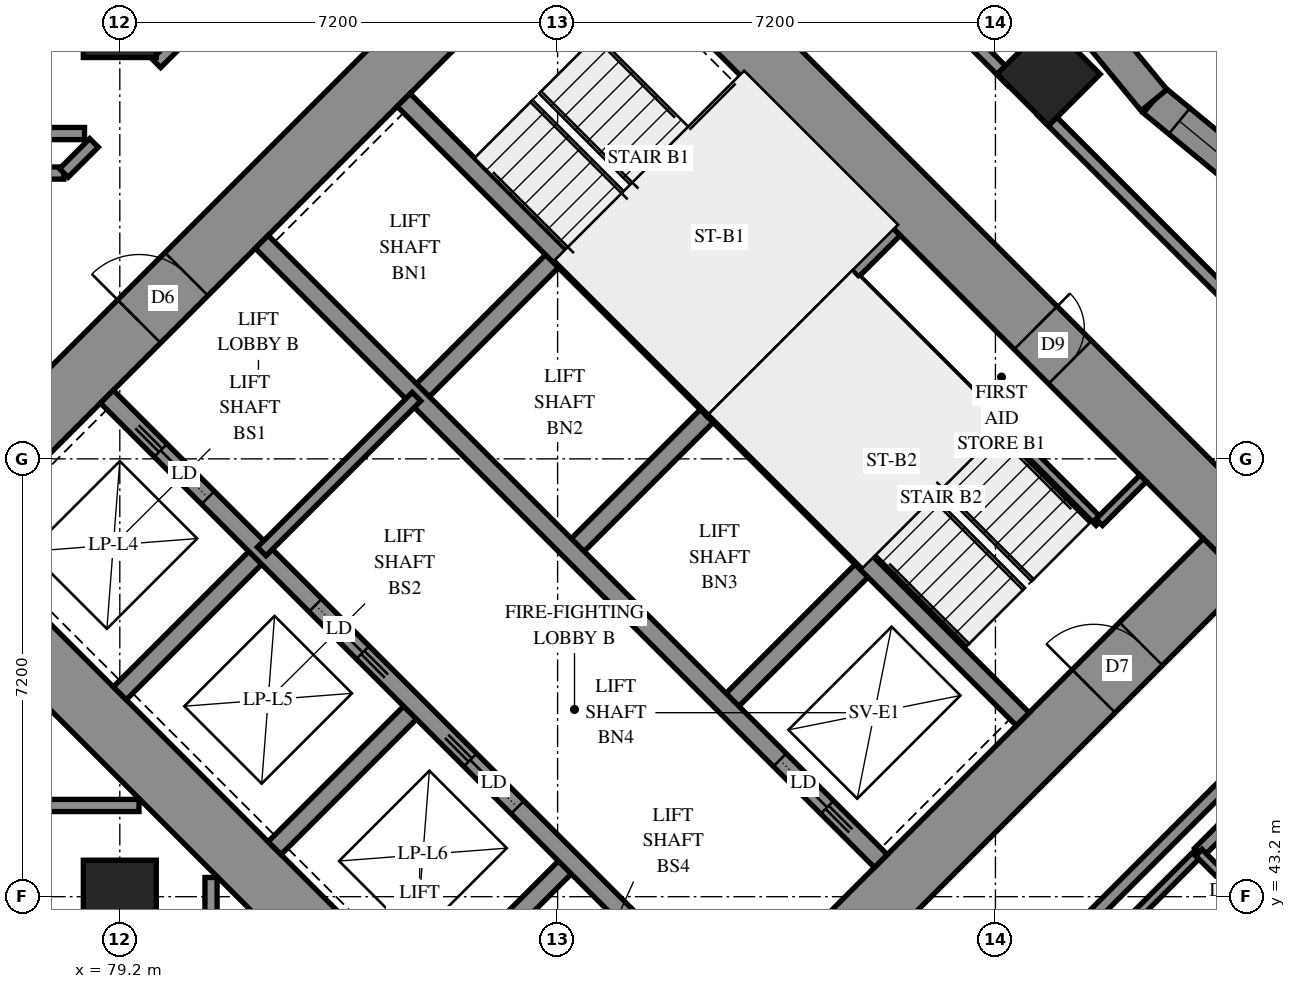
"""IFC4 building model, lengths in metres.
Left out: names, types, materials, properties, quantities, classifications, styles, units other than length and angle.
Written with IfcOpenShell. Run it as: python <this file> out.ifc"""

import sys

from ifc_helpers import new_model, si_unit, direction, frame, frame_2d, origin, origin_2d, place, context, subcontext, project, spatial, polyline, rectangle, outline, extrude, element, fill, save


model = new_model("IFC4")
c1 = context("Model", 3, precision=1e-05, world=origin(), true_north=direction((0.0, 1.0)))
c2 = subcontext(c1, "Body", "Model", "MODEL_VIEW")
j1 = project(units=[si_unit("LENGTHUNIT", "METRE"), si_unit("PLANEANGLEUNIT", "RADIAN")], contexts=[c1])
p1 = place(None, origin())
s1 = spatial("IfcSite", under=j1, at=p1, CompositionType="ELEMENT")
p2 = place(p1, origin())
s2 = spatial("IfcBuilding", under=s1, at=p2, CompositionType="ELEMENT")
p3 = place(p2, frame((0.0, 0.0, 30.4)))
s3 = spatial("IfcBuildingStorey", under=s2, at=p3, CompositionType="ELEMENT", Elevation=30.4)
for number, where, z_axis, x_axis in (
    (1, (79.2, 43.2, 0.0), (0.0, 0.0, 1.0), (1.0, 0.0, 0.0)),
    (2, (79.2, 57.6, 0.0), (0.0, 0.0, 1.0), (1.0, 0.0, 0.0)),
    (3, (94.474, 56.727, 0.0), (0.0, 0.0, 1.0), (0.707, -0.707, 0.0)),
):
    element("IfcColumn", number, at=place(p3, frame(where, z_axis=z_axis, x_axis=x_axis)), inside=s3, PredefinedType="COLUMN", context=c2, shape_type="SweptSolid", body=[
        extrude(rectangle(XDim=1.2, YDim=1.2, at=origin_2d()), origin(), (0.0, 0.0, 1.0), 3.1),
    ])
p4 = place(p3, frame((75.594, 49.443, -0.3), z_axis=(0.0, 0.0, 1.0), x_axis=(0.7071037324, -0.70710983, 0.0)))
e4 = element("IfcWall", 4, at=p4, inside=s3, PredefinedType="SHEAR", context=c2, shape_type="SweptSolid", body=[
    extrude(rectangle(XDim=16.4, YDim=1.0, at=frame_2d((8.2, 0.0))), origin(), (0.0, 0.0, 1.0), 2.7),
])
p5 = place(p3, frame((86.483, 60.333, -0.3), z_axis=(0.0, 0.0, 1.0), x_axis=(0.70710983, -0.7071037324, 0.0)))
e5 = element("IfcWall", 5, at=p5, inside=s3, PredefinedType="SHEAR", context=c2, shape_type="SweptSolid", body=[
    extrude(rectangle(XDim=16.4, YDim=1.0, at=frame_2d((8.2, 0.0))), origin(), (0.0, 0.0, 1.0), 2.7),
])
p6 = place(p5, frame((11.0, 0.0, 0.3)))
e6 = element("IfcOpeningElement", 6, at=p6, cuts=e5, PredefinedType="OPENING", context=c2, shape_type="SweptSolid", body=[
    extrude(rectangle(XDim=0.8, YDim=2.1, at=frame_2d((0.4, 1.05))), frame((0.0, 0.51, 0.0), z_axis=(0.0, -1.0, 0.0), x_axis=(1.0, 0.0, 0.0)), (0.0, 0.0, 1.0), 1.02),
])
p7 = place(p3, frame((76.301, 49.443, -0.3), z_axis=(0.0, 0.0, 1.0), x_axis=(0.7071067812, 0.7071067812, 0.0)))
e7 = element("IfcWall", 7, at=p7, inside=s3, PredefinedType="SHEAR", context=c2, shape_type="SweptSolid", body=[
    extrude(rectangle(XDim=14.4, YDim=1.0, at=frame_2d((7.2, 0.0))), origin(), (0.0, 0.0, 1.0), 2.7),
])
p8 = place(p7, frame((4.55, 0.0, 0.3)))
e8 = element("IfcOpeningElement", 8, at=p8, cuts=e7, PredefinedType="OPENING", context=c2, shape_type="SweptSolid", body=[
    extrude(rectangle(XDim=1.1, YDim=2.1, at=frame_2d((0.55, 1.05))), frame((0.0, 0.51, 0.0), z_axis=(0.0, -1.0, 0.0), x_axis=(1.0, 0.0, 0.0)), (0.0, 0.0, 1.0), 1.02),
])
p9 = place(p7, frame((11.35, 0.0, 0.3)))
e9 = element("IfcOpeningElement", 9, at=p9, cuts=e7, PredefinedType="OPENING", context=c2, shape_type="SweptSolid", body=[
    extrude(rectangle(XDim=1.1, YDim=2.1, at=frame_2d((0.55, 1.05))), frame((0.0, 0.51, 0.0), z_axis=(0.0, -1.0, 0.0), x_axis=(1.0, 0.0, 0.0)), (0.0, 0.0, 1.0), 1.02),
])
p10 = place(p3, frame((87.19, 38.554, -0.3), z_axis=(0.0, 0.0, 1.0), x_axis=(0.707103309, 0.7071102534, 0.0)))
e10 = element("IfcWall", 10, at=p10, inside=s3, PredefinedType="SHEAR", context=c2, shape_type="SweptSolid", body=[
    extrude(rectangle(XDim=14.4, YDim=1.0, at=frame_2d((7.2, 0.0))), origin(), (0.0, 0.0, 1.0), 2.7),
])
p11 = place(p10, frame((4.55, 0.0, 0.3)))
e11 = element("IfcOpeningElement", 11, at=p11, cuts=e10, PredefinedType="OPENING", context=c2, shape_type="SweptSolid", body=[
    extrude(rectangle(XDim=1.1, YDim=2.1, at=frame_2d((0.55, 1.05))), frame((0.0, 0.51, 0.0), z_axis=(0.0, -1.0, 0.0), x_axis=(1.0, 0.0, 0.0)), (0.0, 0.0, 1.0), 1.02),
])
p12 = place(p10, frame((11.35, 0.0, 0.3)))
e12 = element("IfcOpeningElement", 12, at=p12, cuts=e10, PredefinedType="OPENING", context=c2, shape_type="SweptSolid", body=[
    extrude(rectangle(XDim=1.1, YDim=2.1, at=frame_2d((0.55, 1.05))), frame((0.0, 0.51, 0.0), z_axis=(0.0, -1.0, 0.0), x_axis=(1.0, 0.0, 0.0)), (0.0, 0.0, 1.0), 1.02),
])
for number, where, z_axis, x_axis in (
    (13, (79.2, 46.544, 0.0), (0.0, 0.0, 1.0), (0.707, 0.707, 0.0)),
    (14, (84.079, 51.423, 0.0), (0.0, 0.0, 1.0), (0.707, 0.707, 0.0)),
):
    element("IfcWall", number, at=place(p3, frame(where, z_axis=z_axis, x_axis=x_axis)), inside=s3, PredefinedType="SOLIDWALL", context=c2, shape_type="SweptSolid", body=[
        extrude(rectangle(XDim=3.3, YDim=0.3, at=frame_2d((1.65, 0.0))), origin(), (0.0, 0.0, 1.0), 3.1),
    ])
p13 = place(p3, frame((81.746, 43.999, 0.0), z_axis=(0.0, 0.0, 1.0), x_axis=(0.7071067812, 0.7071067812, 0.0)))
e15 = element("IfcWall", 15, at=p13, inside=s3, PredefinedType="SOLIDWALL", context=c2, shape_type="SweptSolid", body=[
    extrude(rectangle(XDim=3.3, YDim=0.3, at=frame_2d((1.65, 0.0))), origin(), (0.0, 0.0, 1.0), 3.1),
])
p14 = place(p3, frame((86.625, 48.878, 0.0), z_axis=(0.0, 0.0, 1.0), x_axis=(0.7071067812, 0.7071067812, 0.0)))
e16 = element("IfcWall", 16, at=p14, inside=s3, PredefinedType="SOLIDWALL", context=c2, shape_type="SweptSolid", body=[
    extrude(rectangle(XDim=3.3, YDim=0.3, at=frame_2d((1.65, 0.0))), origin(), (0.0, 0.0, 1.0), 3.1),
])
p15 = place(p3, frame((84.291, 41.453, 0.0), z_axis=(0.0, 0.0, 1.0), x_axis=(0.7071067812, 0.7071067812, 0.0)))
e17 = element("IfcWall", 17, at=p15, inside=s3, PredefinedType="SOLIDWALL", context=c2, shape_type="SweptSolid", body=[
    extrude(rectangle(XDim=3.3, YDim=0.3, at=frame_2d((1.65, 0.0))), origin(), (0.0, 0.0, 1.0), 3.1),
])
p16 = place(p3, frame((89.17, 46.332, 0.0), z_axis=(0.0, 0.0, 1.0), x_axis=(0.7071067812, 0.7071067812, 0.0)))
e18 = element("IfcWall", 18, at=p16, inside=s3, PredefinedType="SOLIDWALL", context=c2, shape_type="SweptSolid", body=[
    extrude(rectangle(XDim=3.3, YDim=0.3, at=frame_2d((1.65, 0.0))), origin(), (0.0, 0.0, 1.0), 3.1),
])
p17 = place(p3, frame((78.988, 51.423, 0.0), z_axis=(0.0, 0.0, 1.0), x_axis=(0.7071067812, -0.7071067812, 0.0)))
e19 = element("IfcWall", 19, at=p17, inside=s3, PredefinedType="SOLIDWALL", context=c2, shape_type="SweptSolid", body=[
    extrude(rectangle(XDim=14.4, YDim=0.3, at=frame_2d((7.2, 0.0))), origin(), (0.0, 0.0, 1.0), 3.1),
])
p18 = place(p17, frame((1.25, 0.0, 0.0)))
e20 = element("IfcOpeningElement", 20, at=p18, cuts=e19, PredefinedType="OPENING", context=c2, shape_type="SweptSolid", body=[
    extrude(rectangle(XDim=1.1, YDim=2.1, at=frame_2d((0.55, 1.05))), frame((0.0, 0.16, 0.0), z_axis=(0.0, -1.0, 0.0), x_axis=(1.0, 0.0, 0.0)), (0.0, 0.0, 1.0), 0.32),
])
p19 = place(p17, frame((4.85, 0.0, 0.0)))
e21 = element("IfcOpeningElement", 21, at=p19, cuts=e19, PredefinedType="OPENING", context=c2, shape_type="SweptSolid", body=[
    extrude(rectangle(XDim=1.1, YDim=2.1, at=frame_2d((0.55, 1.05))), frame((0.0, 0.16, 0.0), z_axis=(0.0, -1.0, 0.0), x_axis=(1.0, 0.0, 0.0)), (0.0, 0.0, 1.0), 0.32),
])
p20 = place(p17, frame((8.45, 0.0, 0.0)))
e22 = element("IfcOpeningElement", 22, at=p20, cuts=e19, PredefinedType="OPENING", context=c2, shape_type="SweptSolid", body=[
    extrude(rectangle(XDim=1.1, YDim=2.1, at=frame_2d((0.55, 1.05))), frame((0.0, 0.16, 0.0), z_axis=(0.0, -1.0, 0.0), x_axis=(1.0, 0.0, 0.0)), (0.0, 0.0, 1.0), 0.32),
])
p21 = place(p17, frame((12.05, 0.0, 0.0)))
e23 = element("IfcOpeningElement", 23, at=p21, cuts=e19, PredefinedType="OPENING", context=c2, shape_type="SweptSolid", body=[
    extrude(rectangle(XDim=1.1, YDim=2.1, at=frame_2d((0.55, 1.05))), frame((0.0, 0.16, 0.0), z_axis=(0.0, -1.0, 0.0), x_axis=(1.0, 0.0, 0.0)), (0.0, 0.0, 1.0), 0.32),
])
p22 = place(p3, frame((81.534, 53.969, 0.0), z_axis=(0.0, 0.0, 1.0), x_axis=(0.707103309, -0.7071102534, 0.0)))
e24 = element("IfcWall", 24, at=p22, inside=s3, PredefinedType="SOLIDWALL", context=c2, shape_type="SweptSolid", body=[
    extrude(rectangle(XDim=14.4, YDim=0.3, at=frame_2d((7.2, 0.0))), origin(), (0.0, 0.0, 1.0), 3.1),
])
p23 = place(p22, frame((12.05, 0.0, 0.0)))
e25 = element("IfcOpeningElement", 25, at=p23, cuts=e24, PredefinedType="OPENING", context=c2, shape_type="SweptSolid", body=[
    extrude(rectangle(XDim=1.1, YDim=2.1, at=frame_2d((0.55, 1.05))), frame((0.0, 0.16, 0.0), z_axis=(0.0, -1.0, 0.0), x_axis=(1.0, 0.0, 0.0)), (0.0, 0.0, 1.0), 0.32),
])
for number, where, z_axis, x_axis in (
    (26, (83.867, 56.302, 0.0), (0.0, 0.0, 1.0), (0.707, -0.707, 0.0)),
    (27, (88.958, 51.211, 0.0), (0.0, 0.0, 1.0), (0.707, -0.707, 0.0)),
):
    element("IfcWall", number, at=place(p3, frame(where, z_axis=z_axis, x_axis=x_axis)), inside=s3, PredefinedType="SOLIDWALL", context=c2, shape_type="SweptSolid", body=[
        extrude(rectangle(XDim=7.2, YDim=0.3, at=frame_2d((3.6, 0.0))), origin(), (0.0, 0.0, 1.0), 3.1),
    ])
p24 = place(p3, frame((88.958, 51.211, 0.0), z_axis=(0.0, 0.0, 1.0), x_axis=(0.7071067812, 0.7071067812, 0.0)))
e28 = element("IfcWall", 28, at=p24, inside=s3, PredefinedType="SOLIDWALL", context=c2, shape_type="SweptSolid", body=[
    extrude(rectangle(XDim=4.2, YDim=0.3, at=frame_2d((2.1, 0.0))), origin(), (0.0, 0.0, 1.0), 3.1),
])
p25 = place(p3, frame((98.867, 54.107, 0.0), z_axis=(0.0, 0.0, 1.0), x_axis=(-0.7715741005, 0.636139456, 0.0)))
e29 = element("IfcWall", 29, at=p25, inside=s3, PredefinedType="SOLIDWALL", context=c2, shape_type="SweptSolid", body=[
    extrude(outline(polyline([(-0.026, -0.275), (3.42, -0.275), (3.472, 0.275), (0.026, 0.275), (-0.026, -0.275)])), origin(), (0.0, 0.0, 1.0), 3.1),
])
p26 = place(p25, frame((1.706, 0.0, 0.5)))
e30 = element("IfcOpeningElement", 30, at=p26, cuts=e29, PredefinedType="OPENING", context=c2, shape_type="SweptSolid", body=[
    extrude(rectangle(XDim=1.2, YDim=2.45, at=frame_2d((0.6, 1.225))), frame((0.0, 0.285, 0.0), z_axis=(0.0, -1.0, 0.0), x_axis=(1.0, 0.0, 0.0)), (0.0, 0.0, 1.0), 0.57),
])
p27 = place(p3, frame((96.208, 56.299, 0.0), z_axis=(0.0, 0.0, 1.0), x_axis=(-0.6361567317, 0.7715598569, 0.0)))
e31 = element("IfcWall", 31, at=p27, inside=s3, PredefinedType="SOLIDWALL", context=c2, shape_type="SweptSolid", body=[
    extrude(outline(polyline([(0.026, -0.275), (3.472, -0.275), (3.42, 0.275), (-0.026, 0.275), (0.026, -0.275)])), origin(), (0.0, 0.0, 1.0), 3.1),
])
p28 = place(p27, frame((1.778, 0.0, 0.5)))
e32 = element("IfcOpeningElement", 32, at=p28, cuts=e31, PredefinedType="OPENING", context=c2, shape_type="SweptSolid", body=[
    extrude(rectangle(XDim=1.2, YDim=2.45, at=frame_2d((0.6, 1.225))), frame((0.0, 0.285, 0.0), z_axis=(0.0, -1.0, 0.0), x_axis=(1.0, 0.0, 0.0)), (0.0, 0.0, 1.0), 0.57),
])
p29 = place(p3, frame((91.313, 53.354, 0.0), z_axis=(0.0, 0.0, 1.0), x_axis=(0.7071067812, -0.7071067812, 0.0)))
e33 = element("IfcWall", 33, at=p29, inside=s3, PredefinedType="PARTITIONING", context=c2, shape_type="SweptSolid", body=[
    extrude(rectangle(XDim=5.65, YDim=0.15, at=frame_2d((2.825, 0.0))), origin(), (0.0, 0.0, 1.0), 3.1),
])
p30 = place(p3, frame((95.308, 49.358, 0.0), z_axis=(0.0, 0.0, 1.0), x_axis=(0.70705776, 0.707155799, 0.0)))
e34 = element("IfcWall", 34, at=p30, inside=s3, PredefinedType="PARTITIONING", context=c2, shape_type="SweptSolid", body=[
    extrude(rectangle(XDim=1.02, YDim=0.15, at=frame_2d((0.51, 0.0))), origin(), (0.0, 0.0, 1.0), 3.1),
])
p31 = place(p3, frame((81.534, 48.878, 0.0), z_axis=(0.0, 0.0, 1.0), x_axis=(0.707092892, 0.7071206701, 0.0)))
e35 = element("IfcWall", 35, at=p31, inside=s3, PredefinedType="PARTITIONING", context=c2, shape_type="SweptSolid", body=[
    extrude(rectangle(XDim=3.6, YDim=0.2, at=frame_2d((1.8, 0.0))), origin(), (0.0, 0.0, 1.0), 3.1),
])
p32 = place(p3, frame((94.901, 42.583, 0.0), z_axis=(0.0, 0.0, 1.0), x_axis=(0.7072154749, 0.7069980708, 0.0)))
e36 = element("IfcWall", 36, at=p32, inside=s3, PredefinedType="PARTITIONING", context=c2, shape_type="SweptSolid", body=[
    extrude(rectangle(XDim=9.2, YDim=0.2, at=frame_2d((4.6, 0.0))), origin(), (0.0, 0.0, 1.0), 3.1),
])
p33 = place(p3, frame((96.947, 43.929, 0.0), z_axis=(0.0, 0.0, 1.0), x_axis=(0.707112894, 0.7071006683, 0.0)))
e37 = element("IfcWall", 37, at=p33, inside=s3, PredefinedType="PARTITIONING", context=c2, shape_type="SweptSolid", body=[
    extrude(rectangle(XDim=8.18, YDim=0.2, at=frame_2d((4.09, 0.0))), origin(), (0.0, 0.0, 1.0), 3.1),
])
p34 = place(p3, frame((89.271, 61.215, 0.0), z_axis=(0.0, 0.0, 1.0), x_axis=(0.7071067812, -0.7071067812, 0.0)))
e38 = element("IfcWall", 38, at=p34, inside=s3, PredefinedType="PARTITIONING", context=c2, shape_type="SweptSolid", body=[
    extrude(rectangle(XDim=6.505, YDim=0.2, at=frame_2d((3.253, 0.0))), origin(), (0.0, 0.0, 1.0), 3.1),
])
p35 = place(p3, frame((94.363, 56.123, 0.0), z_axis=(0.0, 0.0, 1.0), x_axis=(0.7071067812, -0.7071067812, 0.0)))
e39 = element("IfcWall", 39, at=p35, inside=s3, PredefinedType="PARTITIONING", context=c2, shape_type="SweptSolid", body=[
    extrude(rectangle(XDim=6.503, YDim=0.2, at=frame_2d((3.251, 0.0))), origin(), (0.0, 0.0, 1.0), 3.1),
])
p36 = place(p3, frame((75.102, 55.1, 0.0), z_axis=(0.0, 0.0, 1.0), x_axis=(1.0, 0.0, 0.0)))
e40 = element("IfcWall", 40, at=p36, inside=s3, PredefinedType="PARTITIONING", context=c2, shape_type="SweptSolid", body=[
    extrude(rectangle(XDim=3.178, YDim=0.2, at=frame_2d((1.589, 0.0))), origin(), (0.0, 0.0, 1.0), 3.1),
])
p37 = place(p36, frame((0.594, 0.0, 0.0)))
e41 = element("IfcOpeningElement", 41, at=p37, cuts=e40, PredefinedType="OPENING", context=c2, shape_type="SweptSolid", body=[
    extrude(rectangle(XDim=1.0, YDim=2.1, at=frame_2d((0.5, 1.05))), frame((0.0, 0.11, 0.0), z_axis=(0.0, -1.0, 0.0), x_axis=(1.0, 0.0, 0.0)), (0.0, 0.0, 1.0), 0.22),
])
p38 = place(p3, frame((95.252, 42.23, 0.0), z_axis=(0.0, 0.0, 1.0), x_axis=(0.706689978, 0.7075233388, 0.0)))
e42 = element("IfcWall", 42, at=p38, inside=s3, PredefinedType="PARTITIONING", context=c2, shape_type="SweptSolid", body=[
    extrude(rectangle(XDim=2.4, YDim=0.15, at=frame_2d((1.2, 0.0))), origin(), (0.0, 0.0, 1.0), 3.1),
])
p39 = place(p3, frame((96.945, 43.925, 0.0), z_axis=(0.0, 0.0, 1.0), x_axis=(0.7071067812, -0.7071067812, 0.0)))
e43 = element("IfcWall", 43, at=p39, inside=s3, PredefinedType="PARTITIONING", context=c2, shape_type="SweptSolid", body=[
    extrude(rectangle(XDim=1.901, YDim=0.15, at=frame_2d((0.95, 0.0))), origin(), (0.0, 0.0, 1.0), 3.1),
])
p40 = place(p39, frame((0.505, 0.0, 0.0)))
e44 = element("IfcOpeningElement", 44, at=p40, cuts=e43, PredefinedType="OPENING", context=c2, shape_type="SweptSolid", body=[
    extrude(rectangle(XDim=0.8, YDim=2.1, at=frame_2d((0.4, 1.05))), frame((0.0, 0.085, 0.0), z_axis=(0.0, -1.0, 0.0), x_axis=(1.0, 0.0, 0.0)), (0.0, 0.0, 1.0), 0.17),
])
for number, where, z_axis, x_axis in (
    (45, (77.702, 44.7, 0.0), (0.0, 0.0, 1.0), (1.0, 0.0, 0.0)),
    (46, (80.7, 41.702, 0.0), (0.0, 0.0, 1.0), (0.0, 1.0, 0.0)),
):
    element("IfcWall", number, at=place(p3, frame(where, z_axis=z_axis, x_axis=x_axis)), inside=s3, PredefinedType="PARTITIONING", context=c2, shape_type="SweptSolid", body=[
        extrude(rectangle(XDim=1.814, YDim=0.2, at=frame_2d((0.907, 0.0))), origin(), (0.0, 0.0, 1.0), 3.1),
    ])
p41 = place(p3, frame((79.801, 56.905, 0.0), z_axis=(0.0, 0.0, 1.0), x_axis=(0.7071067812, 0.7071067812, 0.0)))
e47 = element("IfcWall", 47, at=p41, inside=s3, PredefinedType="PARTITIONING", context=c2, shape_type="SweptSolid", body=[
    extrude(rectangle(XDim=1.765, YDim=0.2, at=frame_2d((0.882, 0.0))), origin(), (0.0, 0.0, 1.0), 3.1),
])
p42 = place(p3, frame((77.352, 55.75, 0.0), z_axis=(0.0, 0.0, 1.0), x_axis=(1.0, 0.0, 0.0)))
e48 = element("IfcWall", 48, at=p42, inside=s3, PredefinedType="PARTITIONING", context=c2, shape_type="SweptSolid", body=[
    extrude(rectangle(XDim=1.268, YDim=0.2, at=frame_2d((0.634, 0.0))), origin(), (0.0, 0.0, 1.0), 3.1),
])
p43 = place(p3, frame((78.279, 55.1, 0.0), z_axis=(0.0, 0.0, 1.0), x_axis=(0.7071067812, 0.7071067812, 0.0)))
e49 = element("IfcWall", 49, at=p43, inside=s3, PredefinedType="PARTITIONING", context=c2, shape_type="SweptSolid", body=[
    extrude(rectangle(XDim=0.701, YDim=0.2, at=frame_2d((0.351, 0.0))), origin(), (0.0, 0.0, 1.0), 3.1),
])
p44 = place(p26, origin())
e50 = element("IfcWindow", 50, at=p44, inside=s3, PartitioningType="SINGLE_PANEL", PredefinedType="WINDOW", context=c2, shape_type="SweptSolid", body=[
    extrude(rectangle(XDim=1.2, YDim=2.45, at=frame_2d((0.6, 1.225))), frame((0.0, 0.155, 0.0), z_axis=(0.0, -1.0, 0.0), x_axis=(1.0, 0.0, 0.0)), (0.0, 0.0, 1.0), 0.06),
])
fill(e30, e50)
p45 = place(p6, origin())
e51 = element("IfcDoor", 51, at=p45, inside=s3, OperationType="SINGLE_SWING_RIGHT", PredefinedType="DOOR", context=c2, shape_type="SweptSolid", body=[
    extrude(rectangle(XDim=0.8, YDim=2.1, at=frame_2d((0.4, 1.05))), frame((0.0, -0.44, 0.0), z_axis=(0.0, -1.0, 0.0), x_axis=(1.0, 0.0, 0.0)), (0.0, 0.0, 1.0), 0.05),
])
fill(e6, e51)
p46 = place(p8, origin())
e52 = element("IfcDoor", 52, at=p46, inside=s3, OperationType="DOUBLE_DOOR_SINGLE_SWING", PredefinedType="DOOR", context=c2, shape_type="SweptSolid", body=[
    extrude(rectangle(XDim=1.1, YDim=2.1, at=frame_2d((0.55, 1.05))), frame((0.0, 0.025, 0.0), z_axis=(0.0, -1.0, 0.0), x_axis=(1.0, 0.0, 0.0)), (0.0, 0.0, 1.0), 0.05),
])
fill(e8, e52)
p47 = place(p12, origin())
e53 = element("IfcDoor", 53, at=p47, inside=s3, OperationType="SINGLE_SWING_RIGHT", PredefinedType="DOOR", context=c2, shape_type="SweptSolid", body=[
    extrude(rectangle(XDim=1.1, YDim=2.1, at=frame_2d((0.55, 1.05))), frame((0.0, 0.025, 0.0), z_axis=(0.0, -1.0, 0.0), x_axis=(1.0, 0.0, 0.0)), (0.0, 0.0, 1.0), 0.05),
])
fill(e12, e53)
p48 = place(p18, origin())
e54 = element("IfcDoor", 54, at=p48, inside=s3, OperationType="SLIDING_TO_LEFT", PredefinedType="DOOR", context=c2, shape_type="SweptSolid", body=[
    extrude(rectangle(XDim=1.1, YDim=2.1, at=frame_2d((0.55, 1.05))), frame((0.0, 0.025, 0.0), z_axis=(0.0, -1.0, 0.0), x_axis=(1.0, 0.0, 0.0)), (0.0, 0.0, 1.0), 0.05),
])
fill(e20, e54)
p49 = place(p19, origin())
e55 = element("IfcDoor", 55, at=p49, inside=s3, OperationType="SLIDING_TO_RIGHT", PredefinedType="DOOR", context=c2, shape_type="SweptSolid", body=[
    extrude(rectangle(XDim=1.1, YDim=2.1, at=frame_2d((0.55, 1.05))), frame((0.0, 0.025, 0.0), z_axis=(0.0, -1.0, 0.0), x_axis=(1.0, 0.0, 0.0)), (0.0, 0.0, 1.0), 0.05),
])
fill(e21, e55)
p50 = place(p20, origin())
e56 = element("IfcDoor", 56, at=p50, inside=s3, OperationType="SLIDING_TO_LEFT", PredefinedType="DOOR", context=c2, shape_type="SweptSolid", body=[
    extrude(rectangle(XDim=1.1, YDim=2.1, at=frame_2d((0.55, 1.05))), frame((0.0, 0.025, 0.0), z_axis=(0.0, -1.0, 0.0), x_axis=(1.0, 0.0, 0.0)), (0.0, 0.0, 1.0), 0.05),
])
fill(e22, e56)
p51 = place(p23, origin())
e57 = element("IfcDoor", 57, at=p51, inside=s3, OperationType="SLIDING_TO_RIGHT", PredefinedType="DOOR", context=c2, shape_type="SweptSolid", body=[
    extrude(rectangle(XDim=1.1, YDim=2.1, at=frame_2d((0.55, 1.05))), frame((0.0, 0.025, 0.0), z_axis=(0.0, -1.0, 0.0), x_axis=(1.0, 0.0, 0.0)), (0.0, 0.0, 1.0), 0.05),
])
fill(e25, e57)
save(model, sys.argv[1])
